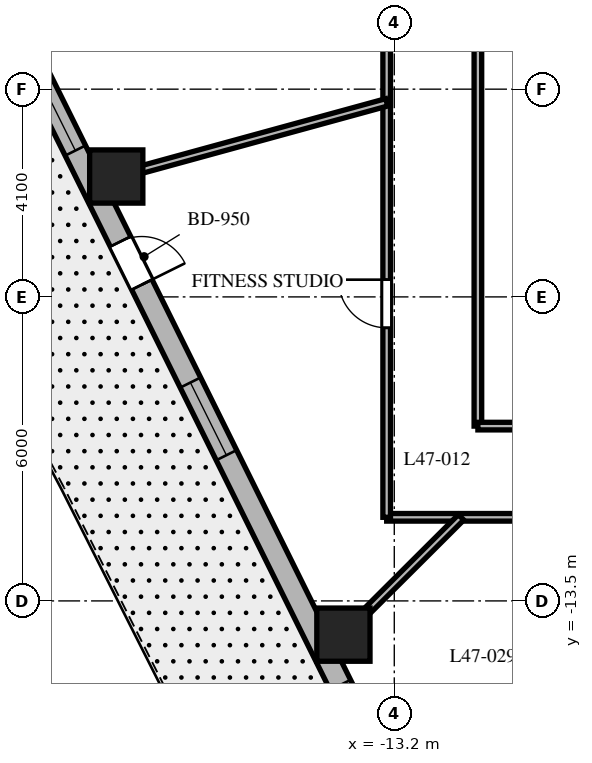
"""IFC4 building model, lengths in metres.
Left out: names, types, materials, properties, quantities, classifications, styles, units other than length and angle.
Written with IfcOpenShell. Run it as: python <this file> out.ifc"""

import sys

from ifc_helpers import new_model, si_unit, direction, frame, frame_2d, origin, origin_2d, place, context, subcontext, project, spatial, rectangle, extrude, element, fill, save


model = new_model("IFC4")
c1 = context("Model", 3, precision=1e-05, world=origin(), true_north=direction((0.0, 1.0)))
c2 = subcontext(c1, "Body", "Model", "MODEL_VIEW")
j1 = project(units=[si_unit("LENGTHUNIT", "METRE"), si_unit("PLANEANGLEUNIT", "RADIAN")], contexts=[c1])
p1 = place(None, origin())
s1 = spatial("IfcSite", under=j1, at=p1, CompositionType="ELEMENT")
p2 = place(p1, origin())
s2 = spatial("IfcBuilding", under=s1, at=p2, CompositionType="ELEMENT")
p3 = place(p2, frame((0.0, 0.0, 190.4)))
s3 = spatial("IfcBuildingStorey", under=s2, at=p3, CompositionType="ELEMENT", Elevation=190.4)
for number, where, z_axis, x_axis in (
    (1, (-18.687, -5.124, 0.0), (0.0, 0.0, 1.0), (1.0, 0.0, 0.0)),
    (2, (-14.204, -14.166, 0.0), (0.0, 0.0, 1.0), (1.0, 0.0, 0.0)),
):
    element("IfcColumn", number, at=place(p3, frame(where, z_axis=z_axis, x_axis=x_axis)), inside=s3, PredefinedType="COLUMN", context=c2, shape_type="SweptSolid", body=[
        extrude(rectangle(XDim=1.05, YDim=1.05, at=origin_2d()), origin(), (0.0, 0.0, 1.0), 3.7),
    ])
p4 = place(p3, frame((-20.618, -2.344, 0.0), z_axis=(0.0, 0.0, 1.0), x_axis=(0.444243691097, -0.895905990002, 0.0)))
e3 = element("IfcWall", 3, at=p4, inside=s3, PredefinedType="SOLIDWALL", context=c2, shape_type="SweptSolid", body=[
    extrude(rectangle(XDim=16.784, YDim=0.45, at=frame_2d((8.392, 0.0))), origin(), (0.0, 0.0, 1.0), 3.4),
])
p5 = place(p4, frame((4.535, 0.0, 0.0)))
e4 = element("IfcOpeningElement", 4, at=p5, cuts=e3, PredefinedType="OPENING", context=c2, shape_type="SweptSolid", body=[
    extrude(rectangle(XDim=0.95, YDim=2.15, at=frame_2d((0.475, 1.075))), frame((0.0, 0.235, 0.0), z_axis=(0.0, -1.0, 0.0), x_axis=(1.0, 0.0, 0.0)), (0.0, 0.0, 1.0), 0.47),
])
p6 = place(p4, frame((0.931, 0.0, 0.8)))
e5 = element("IfcOpeningElement", 5, at=p6, cuts=e3, PredefinedType="OPENING", context=c2, shape_type="SweptSolid", body=[
    extrude(rectangle(XDim=1.6, YDim=1.75, at=frame_2d((0.8, 0.875))), frame((0.0, 0.235, 0.0), z_axis=(0.0, -1.0, 0.0), x_axis=(1.0, 0.0, 0.0)), (0.0, 0.0, 1.0), 0.47),
])
p7 = place(p4, frame((7.642, 0.0, 0.8)))
e6 = element("IfcOpeningElement", 6, at=p7, cuts=e3, PredefinedType="OPENING", context=c2, shape_type="SweptSolid", body=[
    extrude(rectangle(XDim=1.6, YDim=1.75, at=frame_2d((0.8, 0.875))), frame((0.0, 0.235, 0.0), z_axis=(0.0, -1.0, 0.0), x_axis=(1.0, 0.0, 0.0)), (0.0, 0.0, 1.0), 0.47),
])
p8 = place(p4, frame((14.303, 0.0, 0.8)))
e7 = element("IfcOpeningElement", 7, at=p8, cuts=e3, PredefinedType="OPENING", context=c2, shape_type="SweptSolid", body=[
    extrude(rectangle(XDim=1.6, YDim=1.75, at=frame_2d((0.8, 0.875))), frame((0.0, 0.235, 0.0), z_axis=(0.0, -1.0, 0.0), x_axis=(1.0, 0.0, 0.0)), (0.0, 0.0, 1.0), 0.47),
])
p9 = place(p3, frame((13.35, -11.85, 0.0), z_axis=(0.0, 0.0, 1.0), x_axis=(-1.0, 0.0, 0.0)))
e8 = element("IfcWall", 8, at=p9, inside=s3, PredefinedType="PARTITIONING", context=c2, shape_type="SweptSolid", body=[
    extrude(rectangle(XDim=26.7, YDim=0.15, at=frame_2d((13.35, 0.0))), origin(), (0.0, 0.0, 1.0), 2.84),
])
p10 = place(p9, frame((22.459, 0.0, 0.0)))
e9 = element("IfcOpeningElement", 9, at=p10, cuts=e8, PredefinedType="OPENING", context=c2, shape_type="SweptSolid", body=[
    extrude(rectangle(XDim=0.9, YDim=2.03, at=frame_2d((0.45, 1.015))), frame((0.0, 0.085, 0.0), z_axis=(0.0, -1.0, 0.0), x_axis=(1.0, 0.0, 0.0)), (0.0, 0.0, 1.0), 0.17),
])
p11 = place(p9, frame((18.304, 0.0, 0.0)))
e10 = element("IfcOpeningElement", 10, at=p11, cuts=e8, PredefinedType="OPENING", context=c2, shape_type="SweptSolid", body=[
    extrude(rectangle(XDim=0.9, YDim=2.03, at=frame_2d((0.45, 1.015))), frame((0.0, 0.085, 0.0), z_axis=(0.0, -1.0, 0.0), x_axis=(1.0, 0.0, 0.0)), (0.0, 0.0, 1.0), 0.17),
])
p12 = place(p9, frame((12.362, 0.0, 0.0)))
e11 = element("IfcOpeningElement", 11, at=p12, cuts=e8, PredefinedType="OPENING", context=c2, shape_type="SweptSolid", body=[
    extrude(rectangle(XDim=0.95, YDim=2.03, at=frame_2d((0.475, 1.015))), frame((0.0, 0.085, 0.0), z_axis=(0.0, -1.0, 0.0), x_axis=(1.0, 0.0, 0.0)), (0.0, 0.0, 1.0), 0.17),
])
p13 = place(p9, frame((3.995, 0.0, 0.0)))
e12 = element("IfcOpeningElement", 12, at=p13, cuts=e8, PredefinedType="OPENING", context=c2, shape_type="SweptSolid", body=[
    extrude(rectangle(XDim=0.95, YDim=2.03, at=frame_2d((0.475, 1.015))), frame((0.0, 0.085, 0.0), z_axis=(0.0, -1.0, 0.0), x_axis=(1.0, 0.0, 0.0)), (0.0, 0.0, 1.0), 0.17),
])
p14 = place(p3, frame((-13.35, -11.85, 0.0), z_axis=(0.0, 0.0, 1.0), x_axis=(0.0, 1.0, 0.0)))
e13 = element("IfcWall", 13, at=p14, inside=s3, PredefinedType="PARTITIONING", context=c2, shape_type="SweptSolid", body=[
    extrude(rectangle(XDim=23.7, YDim=0.15, at=frame_2d((11.85, 0.0))), origin(), (0.0, 0.0, 1.0), 2.84),
])
p15 = place(p14, frame((18.389, 0.0, 0.0)))
e14 = element("IfcOpeningElement", 14, at=p15, cuts=e13, PredefinedType="OPENING", context=c2, shape_type="SweptSolid", body=[
    extrude(rectangle(XDim=0.95, YDim=2.03, at=frame_2d((0.475, 1.015))), frame((0.0, 0.085, 0.0), z_axis=(0.0, -1.0, 0.0), x_axis=(1.0, 0.0, 0.0)), (0.0, 0.0, 1.0), 0.17),
])
p16 = place(p14, frame((10.751, 0.0, 0.0)))
e15 = element("IfcOpeningElement", 15, at=p16, cuts=e13, PredefinedType="OPENING", context=c2, shape_type="SweptSolid", body=[
    extrude(rectangle(XDim=0.95, YDim=2.03, at=frame_2d((0.475, 1.015))), frame((0.0, 0.085, 0.0), z_axis=(0.0, -1.0, 0.0), x_axis=(1.0, 0.0, 0.0)), (0.0, 0.0, 1.0), 0.17),
])
p17 = place(p14, frame((3.74, 0.0, 0.0)))
e16 = element("IfcOpeningElement", 16, at=p17, cuts=e13, PredefinedType="OPENING", context=c2, shape_type="SweptSolid", body=[
    extrude(rectangle(XDim=0.95, YDim=2.03, at=frame_2d((0.475, 1.015))), frame((0.0, 0.085, 0.0), z_axis=(0.0, -1.0, 0.0), x_axis=(1.0, 0.0, 0.0)), (0.0, 0.0, 1.0), 0.17),
])
p18 = place(p3, frame((-11.55, 2.7, 0.0), z_axis=(0.0, 0.0, 1.0), x_axis=(0.0, -1.0, 0.0)))
e17 = element("IfcWall", 17, at=p18, inside=s3, PredefinedType="PARTITIONING", context=c2, shape_type="SweptSolid", body=[
    extrude(rectangle(XDim=12.75, YDim=0.15, at=frame_2d((6.375, 0.0))), origin(), (0.0, 0.0, 1.0), 2.84),
])
p19 = place(p3, frame((-11.55, -10.05, 0.0), z_axis=(0.0, 0.0, 1.0), x_axis=(1.0, 0.0, 0.0)))
e18 = element("IfcWall", 18, at=p19, inside=s3, PredefinedType="PARTITIONING", context=c2, shape_type="SweptSolid", body=[
    extrude(rectangle(XDim=11.55, YDim=0.15, at=frame_2d((5.775, 0.0))), origin(), (0.0, 0.0, 1.0), 2.84),
])
p20 = place(p3, frame((-13.35, -3.661, 0.0), z_axis=(0.0, 0.0, 1.0), x_axis=(-0.964397145454, -0.264458211898, 0.0)))
e19 = element("IfcWall", 19, at=p20, inside=s3, PredefinedType="PARTITIONING", context=c2, shape_type="SweptSolid", body=[
    extrude(rectangle(XDim=6.039, YDim=0.15, at=frame_2d((3.019, 0.0))), origin(), (0.0, 0.0, 1.0), 2.64),
])
p21 = place(p3, frame((-11.882, -11.85, 0.0), z_axis=(0.0, 0.0, 1.0), x_axis=(-0.708037373639, -0.706174962407, 0.0)))
e20 = element("IfcWall", 20, at=p21, inside=s3, PredefinedType="PARTITIONING", context=c2, shape_type="SweptSolid", body=[
    extrude(rectangle(XDim=3.802, YDim=0.15, at=frame_2d((1.901, 0.0))), origin(), (0.0, 0.0, 1.0), 2.64),
])
p22 = place(p3, frame((-7.136, -11.85, 0.0), z_axis=(0.0, 0.0, 1.0), x_axis=(-0.515900673207, -0.856648408266, 0.0)))
e21 = element("IfcWall", 21, at=p22, inside=s3, PredefinedType="PARTITIONING", context=c2, shape_type="SweptSolid", body=[
    extrude(rectangle(XDim=8.174, YDim=0.15, at=frame_2d((4.087, 0.0))), origin(), (0.0, 0.0, 1.0), 2.64),
])
p23 = place(p5, origin())
e22 = element("IfcDoor", 22, at=p23, inside=s3, OperationType="SINGLE_SWING_RIGHT", PredefinedType="DOOR", context=c2, shape_type="SweptSolid", body=[
    extrude(rectangle(XDim=0.95, YDim=2.15, at=frame_2d((0.475, 1.075))), frame((0.0, 0.025, 0.0), z_axis=(0.0, -1.0, 0.0), x_axis=(1.0, 0.0, 0.0)), (0.0, 0.0, 1.0), 0.05),
])
fill(e4, e22)
p24 = place(p6, origin())
e23 = element("IfcWindow", 23, at=p24, inside=s3, PartitioningType="SINGLE_PANEL", PredefinedType="WINDOW", context=c2, shape_type="SweptSolid", body=[
    extrude(rectangle(XDim=1.6, YDim=1.75, at=frame_2d((0.8, 0.875))), frame((0.0, 0.03, 0.0), z_axis=(0.0, -1.0, 0.0), x_axis=(1.0, 0.0, 0.0)), (0.0, 0.0, 1.0), 0.06),
])
fill(e5, e23)
p25 = place(p7, origin())
e24 = element("IfcWindow", 24, at=p25, inside=s3, PartitioningType="SINGLE_PANEL", PredefinedType="WINDOW", context=c2, shape_type="SweptSolid", body=[
    extrude(rectangle(XDim=1.6, YDim=1.75, at=frame_2d((0.8, 0.875))), frame((0.0, 0.03, 0.0), z_axis=(0.0, -1.0, 0.0), x_axis=(1.0, 0.0, 0.0)), (0.0, 0.0, 1.0), 0.06),
])
fill(e6, e24)
p26 = place(p17, origin())
e25 = element("IfcDoor", 25, at=p26, inside=s3, OperationType="SINGLE_SWING_RIGHT", PredefinedType="DOOR", context=c2, shape_type="SweptSolid", body=[
    extrude(rectangle(XDim=0.95, YDim=2.03, at=frame_2d((0.475, 1.015))), frame((0.0, 0.025, 0.0), z_axis=(0.0, -1.0, 0.0), x_axis=(1.0, 0.0, 0.0)), (0.0, 0.0, 1.0), 0.05),
])
fill(e16, e25)
save(model, sys.argv[1])
